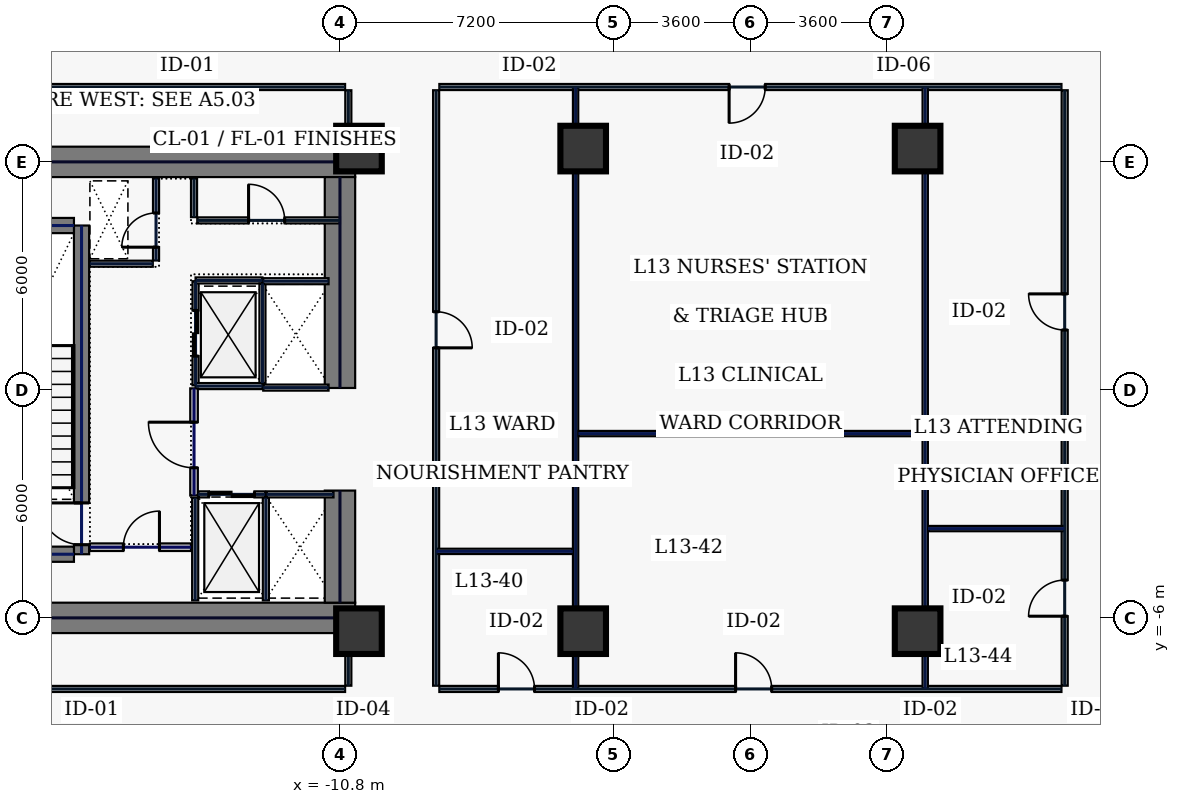
"""IFC4 building model, lengths in metres.
Left out: names, types, materials, properties, quantities, classifications, styles, units other than length and angle.
Written with IfcOpenShell. Run it as: python <this file> out.ifc"""

import sys

from ifc_helpers import new_model, si_unit, direction, frame, frame_2d, origin, origin_2d, place, context, subcontext, project, spatial, rectangle, hollow_rectangle, extrude, element, fill, save


model = new_model("IFC4")
c1 = context("Model", 3, precision=1e-05, world=origin(), true_north=direction((0.0, 1.0)))
c2 = subcontext(c1, "Body", "Model", "MODEL_VIEW")
j1 = project(units=[si_unit("LENGTHUNIT", "METRE"), si_unit("PLANEANGLEUNIT", "RADIAN")], contexts=[c1])
p1 = place(None, origin())
s1 = spatial("IfcSite", under=j1, at=p1, CompositionType="ELEMENT")
p2 = place(p1, origin())
s2 = spatial("IfcBuilding", under=s1, at=p2, CompositionType="ELEMENT")
p3 = place(p2, frame((0.0, 0.0, 63.4)))
s3 = spatial("IfcBuildingStorey", under=s2, at=p3, CompositionType="ELEMENT", Elevation=63.4)
for number, where, z_axis, x_axis in (
    (1, (-22.0, 6.0, 0.0), (0.0, 0.0, 1.0), (1.0, 0.0, 0.0)),
    (2, (-22.0, -6.0, 0.0), (0.0, 0.0, 1.0), (1.0, 0.0, 0.0)),
):
    element("IfcWall", number, at=place(p3, frame(where, z_axis=z_axis, x_axis=x_axis)), inside=s3, PredefinedType="SHEAR", context=c2, shape_type="SweptSolid", body=[
        extrude(rectangle(XDim=11.6, YDim=0.8, at=frame_2d((5.8, 0.0))), origin(), (0.0, 0.0, 1.0), 3.74),
    ])
p4 = place(p3, frame((-10.8, -5.6, 0.0), z_axis=(0.0, 0.0, 1.0), x_axis=(0.0, 1.0, 0.0)))
e3 = element("IfcWall", 3, at=p4, inside=s3, PredefinedType="SHEAR", context=c2, shape_type="SweptSolid", body=[
    extrude(rectangle(XDim=2.95, YDim=0.8, at=frame_2d((1.475, 0.0))), origin(), (0.0, 0.0, 1.0), 3.74),
])
p5 = place(p3, frame((-10.8, 0.05, 0.0), z_axis=(0.0, 0.0, 1.0), x_axis=(0.0, 1.0, 0.0)))
e4 = element("IfcWall", 4, at=p5, inside=s3, PredefinedType="SHEAR", context=c2, shape_type="SweptSolid", body=[
    extrude(rectangle(XDim=5.55, YDim=0.8, at=frame_2d((2.775, 0.0))), origin(), (0.0, 0.0, 1.0), 3.74),
])
p6 = place(p3, frame((-17.6, -4.325, 0.0), z_axis=(0.0, 0.0, 1.0), x_axis=(0.0, 1.0, 0.0)))
e5 = element("IfcWall", 5, at=p6, inside=s3, PredefinedType="SHEAR", context=c2, shape_type="SweptSolid", body=[
    extrude(rectangle(XDim=8.65, YDim=0.4, at=frame_2d((4.325, 0.0))), origin(), (0.0, 0.0, 1.0), 3.74),
])
p7 = place(p6, frame((0.25, 0.0, 0.0)))
e6 = element("IfcOpeningElement", 6, at=p7, cuts=e5, PredefinedType="OPENING", context=c2, shape_type="SweptSolid", body=[
    extrude(rectangle(XDim=1.1, YDim=2.2, at=frame_2d((0.55, 1.1))), frame((0.0, 0.21, 0.0), z_axis=(0.0, -1.0, 0.0), x_axis=(1.0, 0.0, 0.0)), (0.0, 0.0, 1.0), 0.42),
])
for number, where, z_axis, x_axis in (
    (7, (-21.2, -4.325, 0.0), (0.0, 0.0, 1.0), (1.0, 0.0, 0.0)),
    (8, (-21.2, 4.325, 0.0), (0.0, 0.0, 1.0), (1.0, 0.0, 0.0)),
):
    element("IfcWall", number, at=place(p3, frame(where, z_axis=z_axis, x_axis=x_axis)), inside=s3, PredefinedType="SHEAR", context=c2, shape_type="SweptSolid", body=[
        extrude(rectangle(XDim=3.4, YDim=0.4, at=frame_2d((1.7, 0.0))), origin(), (0.0, 0.0, 1.0), 3.74),
    ])
for number, where, z_axis, x_axis in (
    (9, (-10.3, -6.35, 0.0), (0.0, 0.0, 1.0), (1.0, 0.0, 0.0)),
    (10, (-10.3, 6.35, 0.0), (0.0, 0.0, 1.0), (1.0, 0.0, 0.0)),
    (11, (-4.4, -6.35, 0.0), (0.0, 0.0, 1.0), (1.0, 0.0, 0.0)),
    (12, (4.4, -6.35, 0.0), (0.0, 0.0, 1.0), (1.0, 0.0, 0.0)),
    (13, (-4.4, 6.35, 0.0), (0.0, 0.0, 1.0), (1.0, 0.0, 0.0)),
    (14, (4.4, 6.35, 0.0), (0.0, 0.0, 1.0), (1.0, 0.0, 0.0)),
):
    element("IfcColumn", number, at=place(p3, frame(where, z_axis=z_axis, x_axis=x_axis)), inside=s3, PredefinedType="COLUMN", context=c2, shape_type="SweptSolid", body=[
        extrude(hollow_rectangle(XDim=1.2, YDim=1.2, WallThickness=0.05, at=origin_2d()), origin(), (0.0, 0.0, 1.0), 3.74),
    ])
p8 = place(p3, frame((-14.6, 0.12, 0.0), z_axis=(0.0, 0.0, 1.0), x_axis=(0.0, 1.0, 0.0)))
e15 = element("IfcWall", 15, at=p8, inside=s3, PredefinedType="PARTITIONING", context=c2, shape_type="SweptSolid", body=[
    extrude(rectangle(XDim=2.74, YDim=0.16, at=frame_2d((1.37, 0.0))), origin(), (0.0, 0.0, 1.0), 3.74),
])
p9 = place(p8, frame((0.77, 0.0, 0.0)))
e16 = element("IfcOpeningElement", 16, at=p9, cuts=e15, PredefinedType="OPENING", context=c2, shape_type="SweptSolid", body=[
    extrude(rectangle(XDim=1.2, YDim=2.2, at=frame_2d((0.6, 1.1))), frame((0.0, 0.09, 0.0), z_axis=(0.0, -1.0, 0.0), x_axis=(1.0, 0.0, 0.0)), (0.0, 0.0, 1.0), 0.18),
])
for number, where, z_axis, x_axis in (
    (17, (-14.6, 0.1, 0.0), (0.0, 0.0, 1.0), (1.0, 0.0, 0.0)),
    (18, (-14.6, 2.88, 0.0), (0.0, 0.0, 1.0), (1.0, 0.0, 0.0)),
):
    element("IfcWall", number, at=place(p3, frame(where, z_axis=z_axis, x_axis=x_axis)), inside=s3, PredefinedType="PARTITIONING", context=c2, shape_type="SweptSolid", body=[
        extrude(rectangle(XDim=1.76, YDim=0.16, at=frame_2d((0.88, 0.0))), origin(), (0.0, 0.0, 1.0), 3.74),
    ])
p10 = place(p3, frame((-12.84, 0.18, 0.0), z_axis=(0.0, 0.0, 1.0), x_axis=(0.0, 1.0, 0.0)))
e19 = element("IfcWall", 19, at=p10, inside=s3, PredefinedType="PARTITIONING", context=c2, shape_type="SweptSolid", body=[
    extrude(rectangle(XDim=2.62, YDim=0.16, at=frame_2d((1.31, 0.0))), origin(), (0.0, 0.0, 1.0), 3.74),
])
p11 = place(p3, frame((-14.53, -2.75, 0.0), z_axis=(0.0, 0.0, 1.0), x_axis=(1.0, 0.0, 0.0)))
e20 = element("IfcWall", 20, at=p11, inside=s3, PredefinedType="PARTITIONING", context=c2, shape_type="SweptSolid", body=[
    extrude(rectangle(XDim=1.76, YDim=0.16, at=frame_2d((0.88, 0.0))), origin(), (0.0, 0.0, 1.0), 3.74),
])
p12 = place(p11, frame((0.28, 0.0, 0.0)))
e21 = element("IfcOpeningElement", 21, at=p12, cuts=e20, PredefinedType="OPENING", context=c2, shape_type="SweptSolid", body=[
    extrude(rectangle(XDim=1.2, YDim=2.2, at=frame_2d((0.6, 1.1))), frame((0.0, 0.09, 0.0), z_axis=(0.0, -1.0, 0.0), x_axis=(1.0, 0.0, 0.0)), (0.0, 0.0, 1.0), 0.18),
])
for number, where, z_axis, x_axis in (
    (22, (-12.75, -5.54, 0.0), (0.0, 0.0, 1.0), (0.0, 1.0, 0.0)),
    (23, (-14.61, -5.54, 0.0), (0.0, 0.0, 1.0), (0.0, 1.0, 0.0)),
):
    element("IfcWall", number, at=place(p3, frame(where, z_axis=z_axis, x_axis=x_axis)), inside=s3, PredefinedType="PARTITIONING", context=c2, shape_type="SweptSolid", body=[
        extrude(rectangle(XDim=2.7, YDim=0.16, at=frame_2d((1.35, 0.0))), origin(), (0.0, 0.0, 1.0), 3.74),
    ])
p13 = place(p3, frame((-12.73, -2.75, 0.0), z_axis=(0.0, 0.0, 1.0), x_axis=(1.0, 0.0, 0.0)))
e24 = element("IfcWall", 24, at=p13, inside=s3, PredefinedType="PARTITIONING", context=c2, shape_type="SweptSolid", body=[
    extrude(rectangle(XDim=1.76, YDim=0.16, at=frame_2d((0.88, 0.0))), origin(), (0.0, 0.0, 1.0), 3.74),
])
for number, where, z_axis, x_axis in (
    (25, (-12.82, 0.06, 0.0), (0.0, 0.0, 1.0), (1.0, 0.0, 0.0)),
    (26, (-12.82, 2.86, 0.0), (0.0, 0.0, 1.0), (1.0, 0.0, 0.0)),
):
    element("IfcWall", number, at=place(p3, frame(where, z_axis=z_axis, x_axis=x_axis)), inside=s3, PredefinedType="PARTITIONING", context=c2, shape_type="SweptSolid", body=[
        extrude(rectangle(XDim=1.72, YDim=0.16, at=frame_2d((0.86, 0.0))), origin(), (0.0, 0.0, 1.0), 3.74),
    ])
p14 = place(p3, frame((-15.64, 3.405, 0.0), z_axis=(0.0, 0.0, 1.0), x_axis=(0.0, 1.0, 0.0)))
e27 = element("IfcWall", 27, at=p14, inside=s3, PredefinedType="PARTITIONING", context=c2, shape_type="SweptSolid", body=[
    extrude(rectangle(XDim=2.155, YDim=0.16, at=frame_2d((1.078, 0.0))), origin(), (0.0, 0.0, 1.0), 3.74),
])
p15 = place(p14, frame((0.35, 0.0, 0.0)))
e28 = element("IfcOpeningElement", 28, at=p15, cuts=e27, PredefinedType="OPENING", context=c2, shape_type="SweptSolid", body=[
    extrude(rectangle(XDim=0.9, YDim=2.2, at=frame_2d((0.45, 1.1))), frame((0.0, 0.09, 0.0), z_axis=(0.0, -1.0, 0.0), x_axis=(1.0, 0.0, 0.0)), (0.0, 0.0, 1.0), 0.18),
])
p16 = place(p3, frame((-17.38, 3.32, 0.0), z_axis=(0.0, 0.0, 1.0), x_axis=(1.0, 0.0, 0.0)))
e29 = element("IfcWall", 29, at=p16, inside=s3, PredefinedType="PARTITIONING", context=c2, shape_type="SweptSolid", body=[
    extrude(rectangle(XDim=1.655, YDim=0.16, at=frame_2d((0.827, 0.0))), origin(), (0.0, 0.0, 1.0), 3.74),
])
p17 = place(p3, frame((-17.38, -4.14, 0.0), z_axis=(0.0, 0.0, 1.0), x_axis=(1.0, 0.0, 0.0)))
e30 = element("IfcWall", 30, at=p17, inside=s3, PredefinedType="SOLIDWALL", context=c2, shape_type="SweptSolid", body=[
    extrude(rectangle(XDim=2.66, YDim=0.2, at=frame_2d((1.33, 0.0))), origin(), (0.0, 0.0, 1.0), 3.74),
])
p18 = place(p17, frame((0.88, 0.0, 0.0)))
e31 = element("IfcOpeningElement", 31, at=p18, cuts=e30, PredefinedType="OPENING", context=c2, shape_type="SweptSolid", body=[
    extrude(rectangle(XDim=0.95, YDim=2.2, at=frame_2d((0.475, 1.1))), frame((0.0, 0.11, 0.0), z_axis=(0.0, -1.0, 0.0), x_axis=(1.0, 0.0, 0.0)), (0.0, 0.0, 1.0), 0.22),
])
p19 = place(p3, frame((-14.555, 4.46, 0.0), z_axis=(0.0, 0.0, 1.0), x_axis=(1.0, 0.0, 0.0)))
e32 = element("IfcWall", 32, at=p19, inside=s3, PredefinedType="PARTITIONING", context=c2, shape_type="SweptSolid", body=[
    extrude(rectangle(XDim=3.755, YDim=0.16, at=frame_2d((1.877, 0.0))), origin(), (0.0, 0.0, 1.0), 3.74),
])
p20 = place(p19, frame((1.35, 0.0, 0.0)))
e33 = element("IfcOpeningElement", 33, at=p20, cuts=e32, PredefinedType="OPENING", context=c2, shape_type="SweptSolid", body=[
    extrude(rectangle(XDim=0.95, YDim=2.2, at=frame_2d((0.475, 1.1))), frame((0.0, 0.09, 0.0), z_axis=(0.0, -1.0, 0.0), x_axis=(1.0, 0.0, 0.0)), (0.0, 0.0, 1.0), 0.18),
])
p21 = place(p3, frame((-14.64, 4.545, 0.0), z_axis=(0.0, 0.0, 1.0), x_axis=(0.0, 1.0, 0.0)))
e34 = element("IfcWall", 34, at=p21, inside=s3, PredefinedType="PARTITIONING", context=c2, shape_type="SweptSolid", body=[
    extrude(rectangle(XDim=1.015, YDim=0.16, at=frame_2d((0.508, 0.0))), origin(), (0.0, 0.0, 1.0), 3.74),
])
p22 = place(p3, frame((-14.64, -2.78, 0.0), z_axis=(0.0, 0.0, 1.0), x_axis=(0.0, 1.0, 0.0)))
e35 = element("IfcWall", 35, at=p22, inside=s3, PredefinedType="SOLIDWALL", context=c2, shape_type="SweptSolid", body=[
    extrude(rectangle(XDim=2.82, YDim=0.2, at=frame_2d((1.41, 0.0))), origin(), (0.0, 0.0, 1.0), 3.74),
])
p23 = place(p22, frame((0.73, 0.0, 0.0)))
e36 = element("IfcOpeningElement", 36, at=p23, cuts=e35, PredefinedType="OPENING", context=c2, shape_type="SweptSolid", body=[
    extrude(rectangle(XDim=1.2, YDim=2.2, at=frame_2d((0.6, 1.1))), frame((0.0, 0.11, 0.0), z_axis=(0.0, -1.0, 0.0), x_axis=(1.0, 0.0, 0.0)), (0.0, 0.0, 1.0), 0.22),
])
p24 = place(p3, frame((8.27, -7.785, 0.0), z_axis=(0.0, 0.0, 1.0), x_axis=(0.0, 1.0, 0.0)))
e37 = element("IfcWall", 37, at=p24, inside=s3, PredefinedType="PARTITIONING", context=c2, shape_type="SweptSolid", body=[
    extrude(rectangle(XDim=15.67, YDim=0.16, at=frame_2d((7.835, 0.0))), origin(), (0.0, 0.0, 1.0), 3.74),
])
p25 = place(p24, frame((1.829, 0.0, 0.0)))
e38 = element("IfcOpeningElement", 38, at=p25, cuts=e37, PredefinedType="OPENING", context=c2, shape_type="SweptSolid", body=[
    extrude(rectangle(XDim=0.95, YDim=2.2, at=frame_2d((0.475, 1.1))), frame((0.0, 0.09, 0.0), z_axis=(0.0, -1.0, 0.0), x_axis=(1.0, 0.0, 0.0)), (0.0, 0.0, 1.0), 0.18),
])
p26 = place(p24, frame((9.361, 0.0, 0.0)))
e39 = element("IfcOpeningElement", 39, at=p26, cuts=e37, PredefinedType="OPENING", context=c2, shape_type="SweptSolid", body=[
    extrude(rectangle(XDim=0.95, YDim=2.2, at=frame_2d((0.475, 1.1))), frame((0.0, 0.09, 0.0), z_axis=(0.0, -1.0, 0.0), x_axis=(1.0, 0.0, 0.0)), (0.0, 0.0, 1.0), 0.18),
])
p27 = place(p3, frame((8.185, 7.97, 0.0), z_axis=(0.0, 0.0, 1.0), x_axis=(-1.0, 0.0, 0.0)))
e40 = element("IfcWall", 40, at=p27, inside=s3, PredefinedType="PARTITIONING", context=c2, shape_type="SweptSolid", body=[
    extrude(rectangle(XDim=16.37, YDim=0.16, at=frame_2d((8.185, 0.0))), origin(), (0.0, 0.0, 1.0), 3.74),
])
p28 = place(p27, frame((7.795, 0.0, 0.0)))
e41 = element("IfcOpeningElement", 41, at=p28, cuts=e40, PredefinedType="OPENING", context=c2, shape_type="SweptSolid", body=[
    extrude(rectangle(XDim=0.95, YDim=2.2, at=frame_2d((0.475, 1.1))), frame((0.0, 0.09, 0.0), z_axis=(0.0, -1.0, 0.0), x_axis=(1.0, 0.0, 0.0)), (0.0, 0.0, 1.0), 0.18),
])
p29 = place(p3, frame((-8.27, 7.885, 0.0), z_axis=(0.0, 0.0, 1.0), x_axis=(0.0, -1.0, 0.0)))
e42 = element("IfcWall", 42, at=p29, inside=s3, PredefinedType="PARTITIONING", context=c2, shape_type="SweptSolid", body=[
    extrude(rectangle(XDim=15.67, YDim=0.16, at=frame_2d((7.835, 0.0))), origin(), (0.0, 0.0, 1.0), 3.74),
])
p30 = place(p29, frame((5.829, 0.0, 0.0)))
e43 = element("IfcOpeningElement", 43, at=p30, cuts=e42, PredefinedType="OPENING", context=c2, shape_type="SweptSolid", body=[
    extrude(rectangle(XDim=0.95, YDim=2.2, at=frame_2d((0.475, 1.1))), frame((0.0, 0.09, 0.0), z_axis=(0.0, -1.0, 0.0), x_axis=(1.0, 0.0, 0.0)), (0.0, 0.0, 1.0), 0.18),
])
p31 = place(p3, frame((-8.185, -7.87, 0.0), z_axis=(0.0, 0.0, 1.0), x_axis=(1.0, 0.0, 0.0)))
e44 = element("IfcWall", 44, at=p31, inside=s3, PredefinedType="PARTITIONING", context=c2, shape_type="SweptSolid", body=[
    extrude(rectangle(XDim=16.37, YDim=0.16, at=frame_2d((8.185, 0.0))), origin(), (0.0, 0.0, 1.0), 3.74),
])
p32 = place(p31, frame((1.554, 0.0, 0.0)))
e45 = element("IfcOpeningElement", 45, at=p32, cuts=e44, PredefinedType="OPENING", context=c2, shape_type="SweptSolid", body=[
    extrude(rectangle(XDim=0.95, YDim=2.2, at=frame_2d((0.475, 1.1))), frame((0.0, 0.09, 0.0), z_axis=(0.0, -1.0, 0.0), x_axis=(1.0, 0.0, 0.0)), (0.0, 0.0, 1.0), 0.18),
])
p33 = place(p31, frame((7.795, 0.0, 0.0)))
e46 = element("IfcOpeningElement", 46, at=p33, cuts=e44, PredefinedType="OPENING", context=c2, shape_type="SweptSolid", body=[
    extrude(rectangle(XDim=0.95, YDim=2.2, at=frame_2d((0.475, 1.1))), frame((0.0, 0.09, 0.0), z_axis=(0.0, -1.0, 0.0), x_axis=(1.0, 0.0, 0.0)), (0.0, 0.0, 1.0), 0.18),
])
p34 = place(p3, frame((-10.58, -7.785, 0.0), z_axis=(0.0, 0.0, 1.0), x_axis=(0.0, 1.0, 0.0)))
e47 = element("IfcWall", 47, at=p34, inside=s3, PredefinedType="PARTITIONING", context=c2, shape_type="SweptSolid", body=[
    extrude(rectangle(XDim=1.365, YDim=0.16, at=frame_2d((0.683, 0.0))), origin(), (0.0, 0.0, 1.0), 3.74),
])
p35 = place(p3, frame((-10.58, 6.42, 0.0), z_axis=(0.0, 0.0, 1.0), x_axis=(0.0, 1.0, 0.0)))
e48 = element("IfcWall", 48, at=p35, inside=s3, PredefinedType="PARTITIONING", context=c2, shape_type="SweptSolid", body=[
    extrude(rectangle(XDim=1.465, YDim=0.16, at=frame_2d((0.732, 0.0))), origin(), (0.0, 0.0, 1.0), 3.74),
])
for number, where, z_axis, x_axis in (
    (49, (-10.665, 7.97, 0.0), (0.0, 0.0, 1.0), (-1.0, 0.0, 0.0)),
    (50, (-27.185, -7.87, 0.0), (0.0, 0.0, 1.0), (1.0, 0.0, 0.0)),
):
    element("IfcWall", number, at=place(p3, frame(where, z_axis=z_axis, x_axis=x_axis)), inside=s3, PredefinedType="PARTITIONING", context=c2, shape_type="SweptSolid", body=[
        extrude(rectangle(XDim=16.52, YDim=0.16, at=frame_2d((8.26, 0.0))), origin(), (0.0, 0.0, 1.0), 3.74),
    ])
for number, where, z_axis, x_axis in (
    (51, (-4.6, -7.865, 0.0), (0.0, 0.0, 1.0), (0.0, 1.0, 0.0)),
    (52, (4.6, -7.865, 0.0), (0.0, 0.0, 1.0), (0.0, 1.0, 0.0)),
):
    element("IfcWall", number, at=place(p3, frame(where, z_axis=z_axis, x_axis=x_axis)), inside=s3, PredefinedType="PARTITIONING", context=c2, shape_type="SweptSolid", body=[
        extrude(rectangle(XDim=15.83, YDim=0.14, at=frame_2d((7.915, 0.0))), origin(), (0.0, 0.0, 1.0), 2.935),
    ])
p36 = place(p3, frame((-4.525, -1.15, 0.0), z_axis=(0.0, 0.0, 1.0), x_axis=(1.0, 0.0, 0.0)))
e53 = element("IfcWall", 53, at=p36, inside=s3, PredefinedType="PARTITIONING", context=c2, shape_type="SweptSolid", body=[
    extrude(rectangle(XDim=9.05, YDim=0.14, at=frame_2d((4.525, 0.0))), origin(), (0.0, 0.0, 1.0), 3.74),
])
for number, where, z_axis, x_axis in (
    (54, (-8.265, -4.25, 0.0), (0.0, 0.0, 1.0), (1.0, 0.0, 0.0)),
    (55, (4.675, -3.65, 0.0), (0.0, 0.0, 1.0), (1.0, 0.0, 0.0)),
):
    element("IfcWall", number, at=place(p3, frame(where, z_axis=z_axis, x_axis=x_axis)), inside=s3, PredefinedType="PARTITIONING", context=c2, shape_type="SweptSolid", body=[
        extrude(rectangle(XDim=3.59, YDim=0.14, at=frame_2d((1.795, 0.0))), origin(), (0.0, 0.0, 1.0), 3.74),
    ])
p37 = place(p7, origin())
e56 = element("IfcDoor", 56, at=p37, inside=s3, OperationType="SINGLE_SWING_RIGHT", PredefinedType="DOOR", context=c2, shape_type="SweptSolid", body=[
    extrude(rectangle(XDim=1.1, YDim=2.2, at=frame_2d((0.55, 1.1))), frame((0.0, 0.025, 0.0), z_axis=(0.0, -1.0, 0.0), x_axis=(1.0, 0.0, 0.0)), (0.0, 0.0, 1.0), 0.05),
])
fill(e6, e56)
p38 = place(p9, origin())
e57 = element("IfcDoor", 57, at=p38, inside=s3, OperationType="SLIDING_TO_LEFT", PredefinedType="DOOR", context=c2, shape_type="SweptSolid", body=[
    extrude(rectangle(XDim=1.2, YDim=2.2, at=frame_2d((0.6, 1.1))), frame((0.0, 0.025, 0.0), z_axis=(0.0, -1.0, 0.0), x_axis=(1.0, 0.0, 0.0)), (0.0, 0.0, 1.0), 0.05),
])
fill(e16, e57)
p39 = place(p12, origin())
e58 = element("IfcDoor", 58, at=p39, inside=s3, OperationType="SLIDING_TO_LEFT", PredefinedType="DOOR", context=c2, shape_type="SweptSolid", body=[
    extrude(rectangle(XDim=1.2, YDim=2.2, at=frame_2d((0.6, 1.1))), frame((0.0, 0.025, 0.0), z_axis=(0.0, -1.0, 0.0), x_axis=(1.0, 0.0, 0.0)), (0.0, 0.0, 1.0), 0.05),
])
fill(e21, e58)
p40 = place(p15, origin())
e59 = element("IfcDoor", 59, at=p40, inside=s3, OperationType="SINGLE_SWING_LEFT", PredefinedType="DOOR", context=c2, shape_type="SweptSolid", body=[
    extrude(rectangle(XDim=0.9, YDim=2.2, at=frame_2d((0.45, 1.1))), frame((0.0, 0.025, 0.0), z_axis=(0.0, -1.0, 0.0), x_axis=(1.0, 0.0, 0.0)), (0.0, 0.0, 1.0), 0.05),
])
fill(e28, e59)
p41 = place(p18, origin())
e60 = element("IfcDoor", 60, at=p41, inside=s3, OperationType="SINGLE_SWING_RIGHT", PredefinedType="DOOR", context=c2, shape_type="SweptSolid", body=[
    extrude(rectangle(XDim=0.95, YDim=2.2, at=frame_2d((0.475, 1.1))), frame((0.0, 0.025, 0.0), z_axis=(0.0, -1.0, 0.0), x_axis=(1.0, 0.0, 0.0)), (0.0, 0.0, 1.0), 0.05),
])
fill(e31, e60)
p42 = place(p20, origin())
e61 = element("IfcDoor", 61, at=p42, inside=s3, OperationType="SINGLE_SWING_LEFT", PredefinedType="DOOR", context=c2, shape_type="SweptSolid", body=[
    extrude(rectangle(XDim=0.95, YDim=2.2, at=frame_2d((0.475, 1.1))), frame((0.0, 0.025, 0.0), z_axis=(0.0, -1.0, 0.0), x_axis=(1.0, 0.0, 0.0)), (0.0, 0.0, 1.0), 0.05),
])
fill(e33, e61)
p43 = place(p23, origin())
e62 = element("IfcDoor", 62, at=p43, inside=s3, OperationType="SINGLE_SWING_RIGHT", PredefinedType="DOOR", context=c2, shape_type="SweptSolid", body=[
    extrude(rectangle(XDim=1.2, YDim=2.2, at=frame_2d((0.6, 1.1))), frame((0.0, 0.025, 0.0), z_axis=(0.0, -1.0, 0.0), x_axis=(1.0, 0.0, 0.0)), (0.0, 0.0, 1.0), 0.05),
])
fill(e36, e62)
p44 = place(p32, origin())
e63 = element("IfcDoor", 63, at=p44, inside=s3, OperationType="SINGLE_SWING_LEFT", PredefinedType="DOOR", context=c2, shape_type="SweptSolid", body=[
    extrude(rectangle(XDim=0.95, YDim=2.2, at=frame_2d((0.475, 1.1))), frame((0.0, 0.025, 0.0), z_axis=(0.0, -1.0, 0.0), x_axis=(1.0, 0.0, 0.0)), (0.0, 0.0, 1.0), 0.05),
])
fill(e45, e63)
p45 = place(p30, origin())
e64 = element("IfcDoor", 64, at=p45, inside=s3, OperationType="SINGLE_SWING_RIGHT", PredefinedType="DOOR", context=c2, shape_type="SweptSolid", body=[
    extrude(rectangle(XDim=0.95, YDim=2.2, at=frame_2d((0.475, 1.1))), frame((0.0, 0.025, 0.0), z_axis=(0.0, -1.0, 0.0), x_axis=(1.0, 0.0, 0.0)), (0.0, 0.0, 1.0), 0.05),
])
fill(e43, e64)
p46 = place(p33, origin())
e65 = element("IfcDoor", 65, at=p46, inside=s3, OperationType="SINGLE_SWING_LEFT", PredefinedType="DOOR", context=c2, shape_type="SweptSolid", body=[
    extrude(rectangle(XDim=0.95, YDim=2.2, at=frame_2d((0.475, 1.1))), frame((0.0, 0.025, 0.0), z_axis=(0.0, -1.0, 0.0), x_axis=(1.0, 0.0, 0.0)), (0.0, 0.0, 1.0), 0.05),
])
fill(e46, e65)
p47 = place(p28, origin())
e66 = element("IfcDoor", 66, at=p47, inside=s3, OperationType="SINGLE_SWING_RIGHT", PredefinedType="DOOR", context=c2, shape_type="SweptSolid", body=[
    extrude(rectangle(XDim=0.95, YDim=2.2, at=frame_2d((0.475, 1.1))), frame((0.0, 0.025, 0.0), z_axis=(0.0, -1.0, 0.0), x_axis=(1.0, 0.0, 0.0)), (0.0, 0.0, 1.0), 0.05),
])
fill(e41, e66)
p48 = place(p25, origin())
e67 = element("IfcDoor", 67, at=p48, inside=s3, OperationType="SINGLE_SWING_LEFT", PredefinedType="DOOR", context=c2, shape_type="SweptSolid", body=[
    extrude(rectangle(XDim=0.95, YDim=2.2, at=frame_2d((0.475, 1.1))), frame((0.0, 0.025, 0.0), z_axis=(0.0, -1.0, 0.0), x_axis=(1.0, 0.0, 0.0)), (0.0, 0.0, 1.0), 0.05),
])
fill(e38, e67)
p49 = place(p26, origin())
e68 = element("IfcDoor", 68, at=p49, inside=s3, OperationType="SINGLE_SWING_RIGHT", PredefinedType="DOOR", context=c2, shape_type="SweptSolid", body=[
    extrude(rectangle(XDim=0.95, YDim=2.2, at=frame_2d((0.475, 1.1))), frame((0.0, 0.025, 0.0), z_axis=(0.0, -1.0, 0.0), x_axis=(1.0, 0.0, 0.0)), (0.0, 0.0, 1.0), 0.05),
])
fill(e39, e68)
save(model, sys.argv[1])
